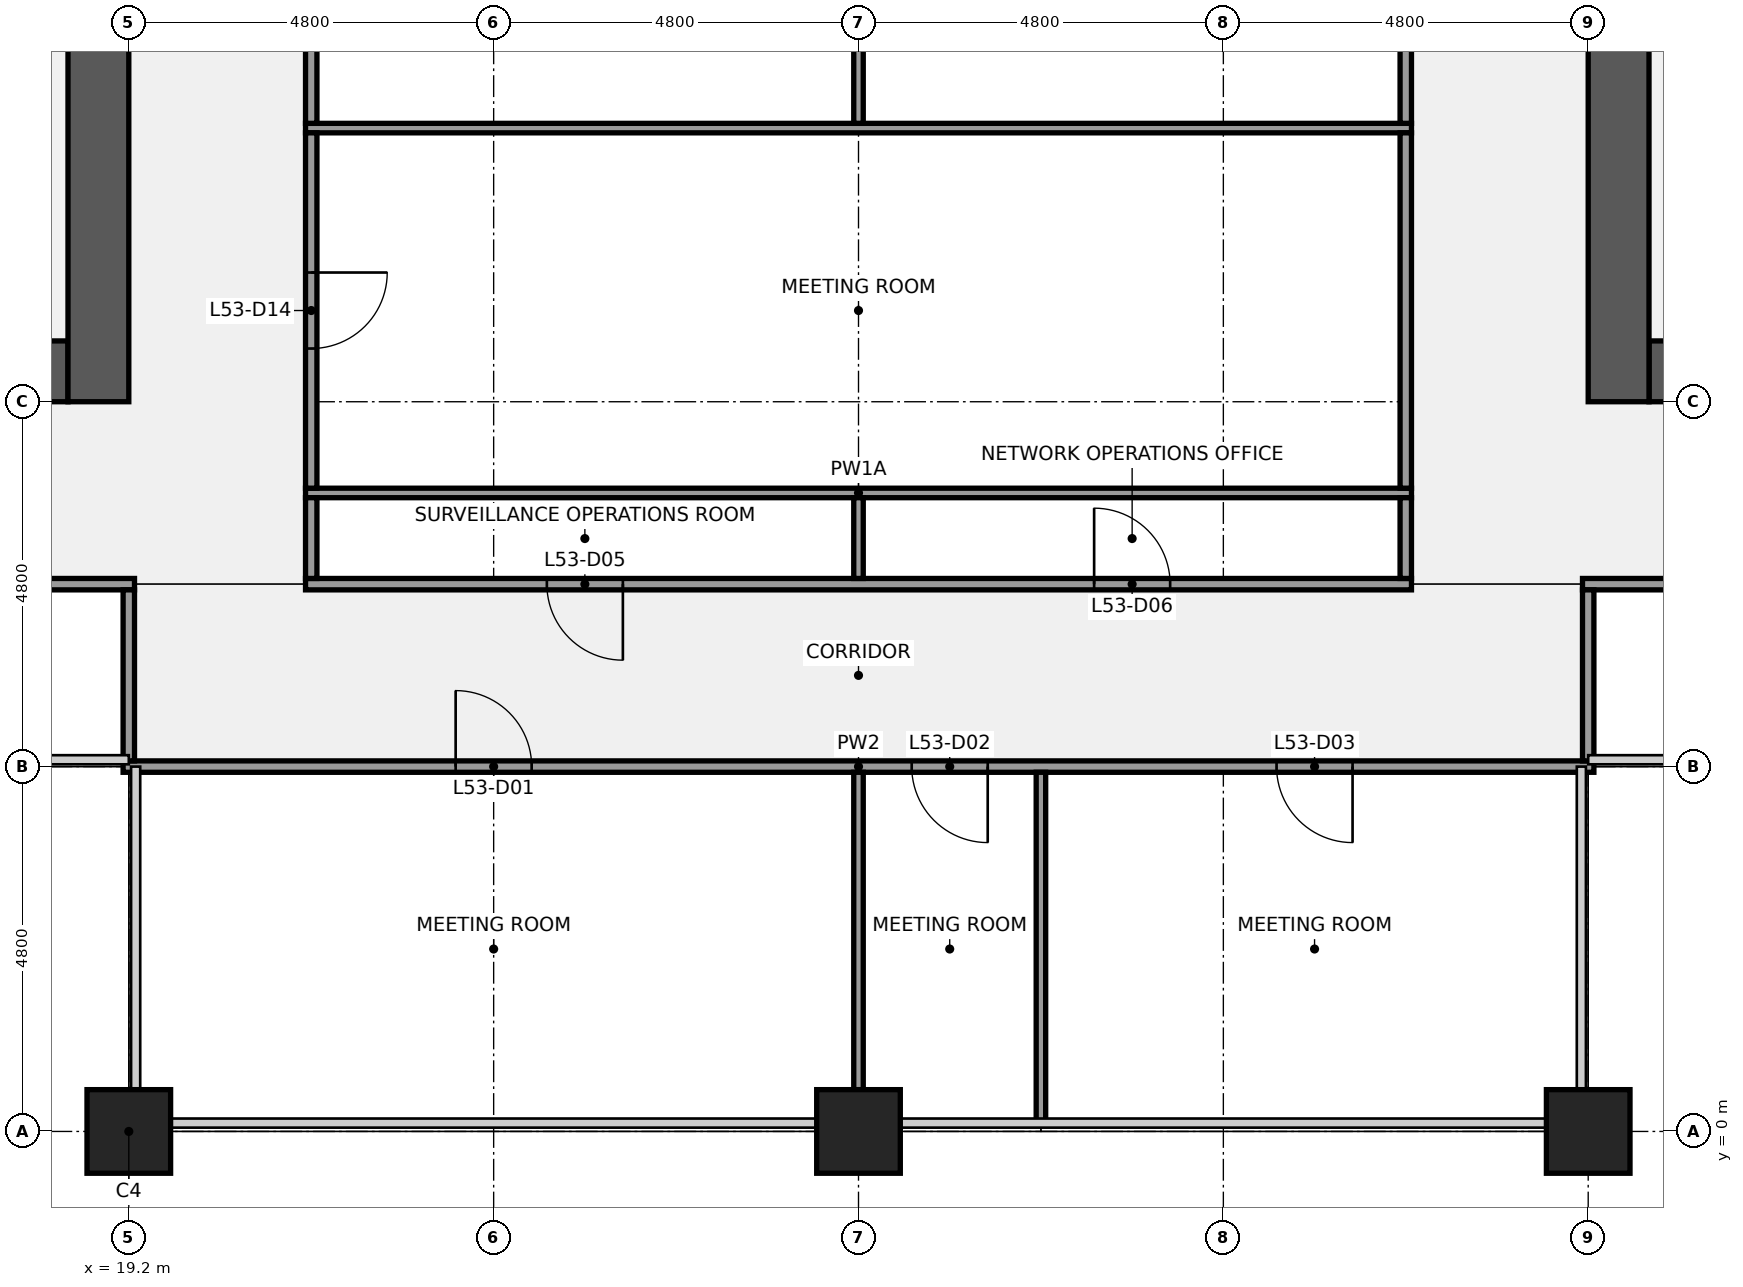
"""IFC4 building model, lengths in metres.
Left out: names, types, materials, properties, quantities, classifications, styles, units other than length and angle.
Written with IfcOpenShell. Run it as: python <this file> out.ifc"""

import sys

from ifc_helpers import new_model, si_unit, direction, frame, frame_2d, origin, origin_2d, place, context, subcontext, project, spatial, rectangle, extrude, element, fill, save


model = new_model("IFC4")
c1 = context("Model", 3, precision=1e-05, world=origin(), true_north=direction((0.0, 1.0)))
c2 = subcontext(c1, "Body", "Model", "MODEL_VIEW")
j1 = project(units=[si_unit("LENGTHUNIT", "METRE"), si_unit("PLANEANGLEUNIT", "RADIAN")], contexts=[c1])
p1 = place(None, origin())
s1 = spatial("IfcSite", under=j1, at=p1, CompositionType="ELEMENT")
p2 = place(p1, origin())
s2 = spatial("IfcBuilding", under=s1, at=p2, CompositionType="ELEMENT")
p3 = place(p2, frame((0.0, 0.0, 241.2)))
s3 = spatial("IfcBuildingStorey", under=s2, at=p3, CompositionType="ELEMENT", Elevation=241.2)
for number, where, z_axis, x_axis in (
    (1, (19.2, 0.0, 0.0), (0.0, 0.0, 1.0), (1.0, 0.0, 0.0)),
    (2, (28.8, 0.0, 0.0), (0.0, 0.0, 1.0), (1.0, 0.0, 0.0)),
    (3, (38.4, 0.0, 0.0), (0.0, 0.0, 1.0), (1.0, 0.0, 0.0)),
):
    element("IfcColumn", number, at=place(p3, frame(where, z_axis=z_axis, x_axis=x_axis)), inside=s3, PredefinedType="COLUMN", context=c2, shape_type="SweptSolid", body=[
        extrude(rectangle(XDim=1.1, YDim=1.1, at=origin_2d()), origin(), (0.0, 0.0, 1.0), 4.0),
    ])
p4 = place(p3, frame((18.4, 10.0, 0.0), z_axis=(0.0, 0.0, 1.0), x_axis=(-1.0, 0.0, 0.0)))
e4 = element("IfcWall", 4, at=p4, inside=s3, PredefinedType="SHEAR", context=c2, shape_type="SweptSolid", body=[
    extrude(rectangle(XDim=4.0, YDim=0.8, at=frame_2d((2.0, 0.0))), origin(), (0.0, 0.0, 1.0), 3.84),
])
p5 = place(p4, frame((1.05, 0.0, 0.0)))
e5 = element("IfcOpeningElement", 5, at=p5, cuts=e4, PredefinedType="OPENING", context=c2, shape_type="SweptSolid", body=[
    extrude(rectangle(XDim=1.1, YDim=2.1, at=frame_2d((0.55, 1.05))), frame((0.0, 0.41, 0.0), z_axis=(0.0, -1.0, 0.0), x_axis=(1.0, 0.0, 0.0)), (0.0, 0.0, 1.0), 0.82),
])
p6 = place(p3, frame((18.8, 38.4, 0.0), z_axis=(0.0, 0.0, 1.0), x_axis=(0.0, -1.0, 0.0)))
e6 = element("IfcWall", 6, at=p6, inside=s3, PredefinedType="SHEAR", context=c2, shape_type="SweptSolid", body=[
    extrude(rectangle(XDim=28.8, YDim=0.8, at=frame_2d((14.4, 0.0))), origin(), (0.0, 0.0, 1.0), 3.84),
])
p7 = place(p6, frame((18.3, 0.0, 0.0)))
e7 = element("IfcOpeningElement", 7, at=p7, cuts=e6, PredefinedType="OPENING", context=c2, shape_type="SweptSolid", body=[
    extrude(rectangle(XDim=1.8, YDim=2.1, at=frame_2d((0.9, 1.05))), frame((0.0, 0.41, 0.0), z_axis=(0.0, -1.0, 0.0), x_axis=(1.0, 0.0, 0.0)), (0.0, 0.0, 1.0), 0.82),
])
p8 = place(p6, frame((8.7, 0.0, 0.0)))
e8 = element("IfcOpeningElement", 8, at=p8, cuts=e6, PredefinedType="OPENING", context=c2, shape_type="SweptSolid", body=[
    extrude(rectangle(XDim=1.8, YDim=2.1, at=frame_2d((0.9, 1.05))), frame((0.0, 0.41, 0.0), z_axis=(0.0, -1.0, 0.0), x_axis=(1.0, 0.0, 0.0)), (0.0, 0.0, 1.0), 0.82),
])
p9 = place(p3, frame((43.2, 10.0, 0.0), z_axis=(0.0, 0.0, 1.0), x_axis=(-1.0, 0.0, 0.0)))
e9 = element("IfcWall", 9, at=p9, inside=s3, PredefinedType="SHEAR", context=c2, shape_type="SweptSolid", body=[
    extrude(rectangle(XDim=4.0, YDim=0.8, at=frame_2d((2.0, 0.0))), origin(), (0.0, 0.0, 1.0), 3.84),
])
p10 = place(p9, frame((1.85, 0.0, 0.0)))
e10 = element("IfcOpeningElement", 10, at=p10, cuts=e9, PredefinedType="OPENING", context=c2, shape_type="SweptSolid", body=[
    extrude(rectangle(XDim=1.1, YDim=2.1, at=frame_2d((0.55, 1.05))), frame((0.0, 0.41, 0.0), z_axis=(0.0, -1.0, 0.0), x_axis=(1.0, 0.0, 0.0)), (0.0, 0.0, 1.0), 0.82),
])
p11 = place(p3, frame((38.8, 9.6, 0.0), z_axis=(0.0, 0.0, 1.0), x_axis=(0.0, 1.0, 0.0)))
e11 = element("IfcWall", 11, at=p11, inside=s3, PredefinedType="SHEAR", context=c2, shape_type="SweptSolid", body=[
    extrude(rectangle(XDim=28.8, YDim=0.8, at=frame_2d((14.4, 0.0))), origin(), (0.0, 0.0, 1.0), 3.84),
])
p12 = place(p11, frame((8.7, 0.0, 0.0)))
e12 = element("IfcOpeningElement", 12, at=p12, cuts=e11, PredefinedType="OPENING", context=c2, shape_type="SweptSolid", body=[
    extrude(rectangle(XDim=1.8, YDim=2.1, at=frame_2d((0.9, 1.05))), frame((0.0, 0.41, 0.0), z_axis=(0.0, -1.0, 0.0), x_axis=(1.0, 0.0, 0.0)), (0.0, 0.0, 1.0), 0.82),
])
p13 = place(p11, frame((18.3, 0.0, 0.0)))
e13 = element("IfcOpeningElement", 13, at=p13, cuts=e11, PredefinedType="OPENING", context=c2, shape_type="SweptSolid", body=[
    extrude(rectangle(XDim=1.8, YDim=2.1, at=frame_2d((0.9, 1.05))), frame((0.0, 0.41, 0.0), z_axis=(0.0, -1.0, 0.0), x_axis=(1.0, 0.0, 0.0)), (0.0, 0.0, 1.0), 0.82),
])
p14 = place(p3, frame((19.125, 4.8, 0.0), z_axis=(0.0, 0.0, 1.0), x_axis=(1.0, 0.0, 0.0)))
e14 = element("IfcWall", 14, at=p14, inside=s3, PredefinedType="PARTITIONING", context=c2, shape_type="SweptSolid", body=[
    extrude(rectangle(XDim=19.35, YDim=0.15, at=frame_2d((9.675, 0.0))), origin(), (0.0, 0.0, 1.0), 2.849),
])
p15 = place(p14, frame((4.375, 0.0, 0.0)))
e15 = element("IfcOpeningElement", 15, at=p15, cuts=e14, PredefinedType="OPENING", context=c2, shape_type="SweptSolid", body=[
    extrude(rectangle(XDim=1.0, YDim=2.1, at=frame_2d((0.5, 1.05))), frame((0.0, 0.085, 0.0), z_axis=(0.0, -1.0, 0.0), x_axis=(1.0, 0.0, 0.0)), (0.0, 0.0, 1.0), 0.17),
])
p16 = place(p14, frame((10.375, 0.0, 0.0)))
e16 = element("IfcOpeningElement", 16, at=p16, cuts=e14, PredefinedType="OPENING", context=c2, shape_type="SweptSolid", body=[
    extrude(rectangle(XDim=1.0, YDim=2.1, at=frame_2d((0.5, 1.05))), frame((0.0, 0.085, 0.0), z_axis=(0.0, -1.0, 0.0), x_axis=(1.0, 0.0, 0.0)), (0.0, 0.0, 1.0), 0.17),
])
p17 = place(p14, frame((15.175, 0.0, 0.0)))
e17 = element("IfcOpeningElement", 17, at=p17, cuts=e14, PredefinedType="OPENING", context=c2, shape_type="SweptSolid", body=[
    extrude(rectangle(XDim=1.0, YDim=2.1, at=frame_2d((0.5, 1.05))), frame((0.0, 0.085, 0.0), z_axis=(0.0, -1.0, 0.0), x_axis=(1.0, 0.0, 0.0)), (0.0, 0.0, 1.0), 0.17),
])
p18 = place(p3, frame((14.5, 7.2, 0.0), z_axis=(0.0, 0.0, 1.0), x_axis=(1.0, 0.0, 0.0)))
e18 = element("IfcWall", 18, at=p18, inside=s3, PredefinedType="PARTITIONING", context=c2, shape_type="SweptSolid", body=[
    extrude(rectangle(XDim=4.775, YDim=0.15, at=frame_2d((2.387, 0.0))), origin(), (0.0, 0.0, 1.0), 2.849),
])
p19 = place(p18, frame((1.85, 0.0, 0.0)))
e19 = element("IfcOpeningElement", 19, at=p19, cuts=e18, PredefinedType="OPENING", context=c2, shape_type="SweptSolid", body=[
    extrude(rectangle(XDim=1.0, YDim=2.1, at=frame_2d((0.5, 1.05))), frame((0.0, 0.085, 0.0), z_axis=(0.0, -1.0, 0.0), x_axis=(1.0, 0.0, 0.0)), (0.0, 0.0, 1.0), 0.17),
])
p20 = place(p3, frame((21.525, 7.2, 0.0), z_axis=(0.0, 0.0, 1.0), x_axis=(1.0, 0.0, 0.0)))
e20 = element("IfcWall", 20, at=p20, inside=s3, PredefinedType="PARTITIONING", context=c2, shape_type="SweptSolid", body=[
    extrude(rectangle(XDim=14.55, YDim=0.15, at=frame_2d((7.275, 0.0))), origin(), (0.0, 0.0, 1.0), 2.849),
])
p21 = place(p20, frame((3.175, 0.0, 0.0)))
e21 = element("IfcOpeningElement", 21, at=p21, cuts=e20, PredefinedType="OPENING", context=c2, shape_type="SweptSolid", body=[
    extrude(rectangle(XDim=1.0, YDim=2.1, at=frame_2d((0.5, 1.05))), frame((0.0, 0.085, 0.0), z_axis=(0.0, -1.0, 0.0), x_axis=(1.0, 0.0, 0.0)), (0.0, 0.0, 1.0), 0.17),
])
p22 = place(p20, frame((10.375, 0.0, 0.0)))
e22 = element("IfcOpeningElement", 22, at=p22, cuts=e20, PredefinedType="OPENING", context=c2, shape_type="SweptSolid", body=[
    extrude(rectangle(XDim=1.0, YDim=2.1, at=frame_2d((0.5, 1.05))), frame((0.0, 0.085, 0.0), z_axis=(0.0, -1.0, 0.0), x_axis=(1.0, 0.0, 0.0)), (0.0, 0.0, 1.0), 0.17),
])
p23 = place(p3, frame((38.325, 7.2, 0.0), z_axis=(0.0, 0.0, 1.0), x_axis=(1.0, 0.0, 0.0)))
e23 = element("IfcWall", 23, at=p23, inside=s3, PredefinedType="PARTITIONING", context=c2, shape_type="SweptSolid", body=[
    extrude(rectangle(XDim=4.775, YDim=0.15, at=frame_2d((2.388, 0.0))), origin(), (0.0, 0.0, 1.0), 2.849),
])
p24 = place(p23, frame((1.925, 0.0, 0.0)))
e24 = element("IfcOpeningElement", 24, at=p24, cuts=e23, PredefinedType="OPENING", context=c2, shape_type="SweptSolid", body=[
    extrude(rectangle(XDim=1.0, YDim=2.1, at=frame_2d((0.5, 1.05))), frame((0.0, 0.085, 0.0), z_axis=(0.0, -1.0, 0.0), x_axis=(1.0, 0.0, 0.0)), (0.0, 0.0, 1.0), 0.17),
])
for number, where, z_axis, x_axis in (
    (25, (21.525, 8.4, 0.0), (0.0, 0.0, 1.0), (1.0, 0.0, 0.0)),
    (26, (21.525, 13.2, 0.0), (0.0, 0.0, 1.0), (1.0, 0.0, 0.0)),
):
    element("IfcWall", number, at=place(p3, frame(where, z_axis=z_axis, x_axis=x_axis)), inside=s3, PredefinedType="PARTITIONING", context=c2, shape_type="SweptSolid", body=[
        extrude(rectangle(XDim=14.55, YDim=0.125, at=frame_2d((7.275, 0.0))), origin(), (0.0, 0.0, 1.0), 2.849),
    ])
p25 = place(p3, frame((19.2, 4.875, 0.0), z_axis=(0.0, 0.0, 1.0), x_axis=(0.0, 1.0, 0.0)))
e27 = element("IfcWall", 27, at=p25, inside=s3, PredefinedType="PARTITIONING", context=c2, shape_type="SweptSolid", body=[
    extrude(rectangle(XDim=2.25, YDim=0.15, at=frame_2d((1.125, 0.0))), origin(), (0.0, 0.0, 1.0), 2.849),
])
p26 = place(p3, frame((21.6, 7.275, 0.0), z_axis=(0.0, 0.0, 1.0), x_axis=(0.0, 1.0, 0.0)))
e28 = element("IfcWall", 28, at=p26, inside=s3, PredefinedType="PARTITIONING", context=c2, shape_type="SweptSolid", body=[
    extrude(rectangle(XDim=1.062, YDim=0.15, at=frame_2d((0.531, 0.0))), origin(), (0.0, 0.0, 1.0), 2.849),
])
p27 = place(p3, frame((21.6, 8.462, 0.0), z_axis=(0.0, 0.0, 1.0), x_axis=(0.0, 1.0, 0.0)))
e29 = element("IfcWall", 29, at=p27, inside=s3, PredefinedType="PARTITIONING", context=c2, shape_type="SweptSolid", body=[
    extrude(rectangle(XDim=4.675, YDim=0.15, at=frame_2d((2.337, 0.0))), origin(), (0.0, 0.0, 1.0), 2.849),
])
p28 = place(p27, frame((1.837, 0.0, 0.0)))
e30 = element("IfcOpeningElement", 30, at=p28, cuts=e29, PredefinedType="OPENING", context=c2, shape_type="SweptSolid", body=[
    extrude(rectangle(XDim=1.0, YDim=2.1, at=frame_2d((0.5, 1.05))), frame((0.0, 0.085, 0.0), z_axis=(0.0, -1.0, 0.0), x_axis=(1.0, 0.0, 0.0)), (0.0, 0.0, 1.0), 0.17),
])
p29 = place(p3, frame((21.6, 13.262, 0.0), z_axis=(0.0, 0.0, 1.0), x_axis=(0.0, 1.0, 0.0)))
e31 = element("IfcWall", 31, at=p29, inside=s3, PredefinedType="PARTITIONING", context=c2, shape_type="SweptSolid", body=[
    extrude(rectangle(XDim=9.475, YDim=0.15, at=frame_2d((4.738, 0.0))), origin(), (0.0, 0.0, 1.0), 2.849),
])
p30 = place(p29, frame((4.238, 0.0, 0.0)))
e32 = element("IfcOpeningElement", 32, at=p30, cuts=e31, PredefinedType="OPENING", context=c2, shape_type="SweptSolid", body=[
    extrude(rectangle(XDim=1.0, YDim=2.1, at=frame_2d((0.5, 1.05))), frame((0.0, 0.085, 0.0), z_axis=(0.0, -1.0, 0.0), x_axis=(1.0, 0.0, 0.0)), (0.0, 0.0, 1.0), 0.17),
])
p31 = place(p3, frame((28.8, 0.55, 0.0), z_axis=(0.0, 0.0, 1.0), x_axis=(0.0, 1.0, 0.0)))
e33 = element("IfcWall", 33, at=p31, inside=s3, PredefinedType="PARTITIONING", context=c2, shape_type="SweptSolid", body=[
    extrude(rectangle(XDim=4.175, YDim=0.125, at=frame_2d((2.087, 0.0))), origin(), (0.0, 0.0, 1.0), 2.849),
])
p32 = place(p3, frame((28.8, 7.275, 0.0), z_axis=(0.0, 0.0, 1.0), x_axis=(0.0, 1.0, 0.0)))
e34 = element("IfcWall", 34, at=p32, inside=s3, PredefinedType="PARTITIONING", context=c2, shape_type="SweptSolid", body=[
    extrude(rectangle(XDim=1.062, YDim=0.125, at=frame_2d((0.531, 0.0))), origin(), (0.0, 0.0, 1.0), 2.849),
])
p33 = place(p3, frame((28.8, 13.262, 0.0), z_axis=(0.0, 0.0, 1.0), x_axis=(0.0, 1.0, 0.0)))
e35 = element("IfcWall", 35, at=p33, inside=s3, PredefinedType="PARTITIONING", context=c2, shape_type="SweptSolid", body=[
    extrude(rectangle(XDim=9.475, YDim=0.125, at=frame_2d((4.738, 0.0))), origin(), (0.0, 0.0, 1.0), 2.849),
])
p34 = place(p3, frame((31.2, 0.1, 0.0), z_axis=(0.0, 0.0, 1.0), x_axis=(0.0, 1.0, 0.0)))
e36 = element("IfcWall", 36, at=p34, inside=s3, PredefinedType="PARTITIONING", context=c2, shape_type="SweptSolid", body=[
    extrude(rectangle(XDim=4.625, YDim=0.125, at=frame_2d((2.312, 0.0))), origin(), (0.0, 0.0, 1.0), 2.849),
])
p35 = place(p3, frame((36.0, 7.275, 0.0), z_axis=(0.0, 0.0, 1.0), x_axis=(0.0, 1.0, 0.0)))
e37 = element("IfcWall", 37, at=p35, inside=s3, PredefinedType="PARTITIONING", context=c2, shape_type="SweptSolid", body=[
    extrude(rectangle(XDim=1.062, YDim=0.15, at=frame_2d((0.531, 0.0))), origin(), (0.0, 0.0, 1.0), 2.849),
])
p36 = place(p3, frame((36.0, 8.462, 0.0), z_axis=(0.0, 0.0, 1.0), x_axis=(0.0, 1.0, 0.0)))
e38 = element("IfcWall", 38, at=p36, inside=s3, PredefinedType="PARTITIONING", context=c2, shape_type="SweptSolid", body=[
    extrude(rectangle(XDim=4.675, YDim=0.15, at=frame_2d((2.337, 0.0))), origin(), (0.0, 0.0, 1.0), 2.849),
])
p37 = place(p3, frame((36.0, 13.262, 0.0), z_axis=(0.0, 0.0, 1.0), x_axis=(0.0, 1.0, 0.0)))
e39 = element("IfcWall", 39, at=p37, inside=s3, PredefinedType="PARTITIONING", context=c2, shape_type="SweptSolid", body=[
    extrude(rectangle(XDim=9.475, YDim=0.15, at=frame_2d((4.738, 0.0))), origin(), (0.0, 0.0, 1.0), 2.849),
])
p38 = place(p37, frame((4.238, 0.0, 0.0)))
e40 = element("IfcOpeningElement", 40, at=p38, cuts=e39, PredefinedType="OPENING", context=c2, shape_type="SweptSolid", body=[
    extrude(rectangle(XDim=1.0, YDim=2.1, at=frame_2d((0.5, 1.05))), frame((0.0, 0.085, 0.0), z_axis=(0.0, -1.0, 0.0), x_axis=(1.0, 0.0, 0.0)), (0.0, 0.0, 1.0), 0.17),
])
p39 = place(p3, frame((38.4, 4.875, 0.0), z_axis=(0.0, 0.0, 1.0), x_axis=(0.0, 1.0, 0.0)))
e41 = element("IfcWall", 41, at=p39, inside=s3, PredefinedType="PARTITIONING", context=c2, shape_type="SweptSolid", body=[
    extrude(rectangle(XDim=2.25, YDim=0.15, at=frame_2d((1.125, 0.0))), origin(), (0.0, 0.0, 1.0), 2.849),
])
for number, where, z_axis, x_axis in (
    (42, (19.2, -1.025, 0.0), (0.0, 0.0, 1.0), (1.0, 0.0, 0.0)),
    (43, (38.4, -1.025, 0.0), (0.0, 0.0, 1.0), (1.0, 0.0, 0.0)),
):
    element("IfcColumn", number, at=place(p3, frame(where, z_axis=z_axis, x_axis=x_axis)), inside=s3, PredefinedType="PILASTER", context=c2, shape_type="SweptSolid", body=[
        extrude(rectangle(XDim=2.4, YDim=0.95, at=origin_2d()), origin(), (0.0, 0.0, 1.0), 4.0),
    ])
p40 = place(p15, origin())
e44 = element("IfcDoor", 44, at=p40, inside=s3, OperationType="SINGLE_SWING_LEFT", PredefinedType="DOOR", context=c2, shape_type="SweptSolid", body=[
    extrude(rectangle(XDim=1.0, YDim=2.1, at=frame_2d((0.5, 1.05))), frame((0.0, 0.025, 0.0), z_axis=(0.0, -1.0, 0.0), x_axis=(1.0, 0.0, 0.0)), (0.0, 0.0, 1.0), 0.05),
])
fill(e15, e44)
p41 = place(p16, origin())
e45 = element("IfcDoor", 45, at=p41, inside=s3, OperationType="SINGLE_SWING_RIGHT", PredefinedType="DOOR", context=c2, shape_type="SweptSolid", body=[
    extrude(rectangle(XDim=1.0, YDim=2.1, at=frame_2d((0.5, 1.05))), frame((0.0, 0.025, 0.0), z_axis=(0.0, -1.0, 0.0), x_axis=(1.0, 0.0, 0.0)), (0.0, 0.0, 1.0), 0.05),
])
fill(e16, e45)
p42 = place(p17, origin())
e46 = element("IfcDoor", 46, at=p42, inside=s3, OperationType="SINGLE_SWING_RIGHT", PredefinedType="DOOR", context=c2, shape_type="SweptSolid", body=[
    extrude(rectangle(XDim=1.0, YDim=2.1, at=frame_2d((0.5, 1.05))), frame((0.0, 0.025, 0.0), z_axis=(0.0, -1.0, 0.0), x_axis=(1.0, 0.0, 0.0)), (0.0, 0.0, 1.0), 0.05),
])
fill(e17, e46)
p43 = place(p21, origin())
e47 = element("IfcDoor", 47, at=p43, inside=s3, OperationType="SINGLE_SWING_RIGHT", PredefinedType="DOOR", context=c2, shape_type="SweptSolid", body=[
    extrude(rectangle(XDim=1.0, YDim=2.1, at=frame_2d((0.5, 1.05))), frame((0.0, 0.025, 0.0), z_axis=(0.0, -1.0, 0.0), x_axis=(1.0, 0.0, 0.0)), (0.0, 0.0, 1.0), 0.05),
])
fill(e21, e47)
p44 = place(p22, origin())
e48 = element("IfcDoor", 48, at=p44, inside=s3, OperationType="SINGLE_SWING_LEFT", PredefinedType="DOOR", context=c2, shape_type="SweptSolid", body=[
    extrude(rectangle(XDim=1.0, YDim=2.1, at=frame_2d((0.5, 1.05))), frame((0.0, 0.025, 0.0), z_axis=(0.0, -1.0, 0.0), x_axis=(1.0, 0.0, 0.0)), (0.0, 0.0, 1.0), 0.05),
])
fill(e22, e48)
p45 = place(p28, origin())
e49 = element("IfcDoor", 49, at=p45, inside=s3, OperationType="SINGLE_SWING_RIGHT", PredefinedType="DOOR", context=c2, shape_type="SweptSolid", body=[
    extrude(rectangle(XDim=1.0, YDim=2.1, at=frame_2d((0.5, 1.05))), frame((0.0, 0.025, 0.0), z_axis=(0.0, -1.0, 0.0), x_axis=(1.0, 0.0, 0.0)), (0.0, 0.0, 1.0), 0.05),
])
fill(e30, e49)
save(model, sys.argv[1])
